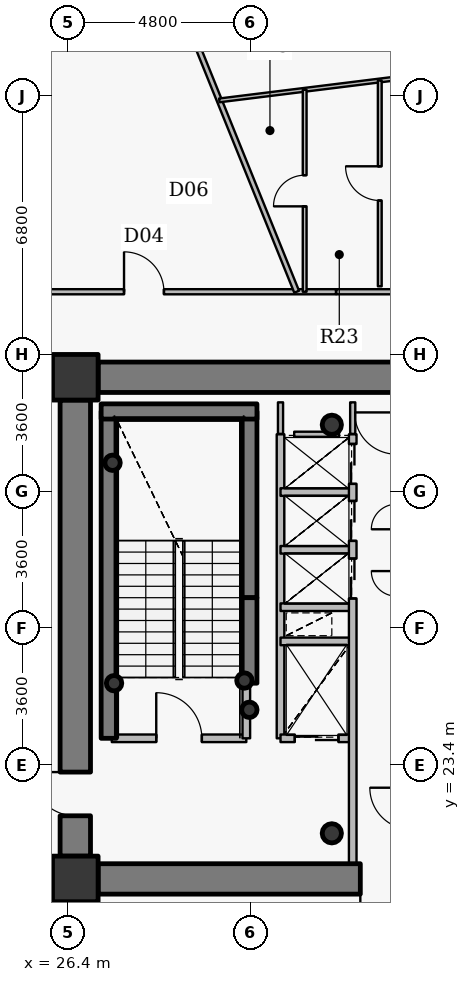
"""IFC4 building model, lengths in metres.
Left out: names, types, materials, properties, quantities, classifications, styles, units other than length and angle.
Written with IfcOpenShell. Run it as: python <this file> out.ifc"""

import sys

from ifc_helpers import new_model, si_unit, direction, frame, frame_2d, origin, origin_2d, place, context, subcontext, project, spatial, rectangle, hollow_circle, extrude, source, transform, mapped, element, fill, save


model = new_model("IFC4")
c1 = context("Model", 3, precision=1e-05, world=origin(), true_north=direction((0.0, 1.0)))
c2 = subcontext(c1, "Body", "Model", "MODEL_VIEW")
j1 = project(units=[si_unit("LENGTHUNIT", "METRE"), si_unit("PLANEANGLEUNIT", "RADIAN")], contexts=[c1])
p1 = place(None, origin())
s1 = spatial("IfcSite", under=j1, at=p1, CompositionType="ELEMENT")
p2 = place(p1, origin())
s2 = spatial("IfcBuilding", under=s1, at=p2, CompositionType="ELEMENT")
p3 = place(p2, frame((0.0, 0.0, 186.15)))
s3 = spatial("IfcBuildingStorey", under=s2, at=p3, CompositionType="ELEMENT", Elevation=186.15)
for number, where, z_axis, x_axis in (
    (1, (26.6, 20.4, 0.0), (0.0, 0.0, 1.0), (1.0, 0.0, 0.0)),
    (2, (26.6, 33.6, 0.0), (0.0, 0.0, 1.0), (1.0, 0.0, 0.0)),
):
    element("IfcColumn", number, at=place(p3, frame(where, z_axis=z_axis, x_axis=x_axis)), inside=s3, PredefinedType="COLUMN", context=c2, shape_type="SweptSolid", body=[
        extrude(rectangle(XDim=1.2, YDim=1.2, at=origin_2d()), origin(), (0.0, 0.0, 1.0), 3.75),
    ])
for number, where, z_axis, x_axis in (
    (3, (33.35, 21.6, 0.0), (0.0, 0.0, 1.0), (1.0, 0.0, 0.0)),
    (4, (33.35, 32.35, 0.0), (0.0, 0.0, 1.0), (1.0, 0.0, 0.0)),
):
    element("IfcColumn", number, at=place(p3, frame(where, z_axis=z_axis, x_axis=x_axis)), inside=s3, PredefinedType="COLUMN", context=c2, shape_type="SweptSolid", body=[
        extrude(hollow_circle(Radius=0.254, WallThickness=0.02, at=origin_2d()), origin(), (0.0, 0.0, 1.0), 3.75),
    ])
p4 = place(p3, frame((27.48, 24.1, 0.0), z_axis=(0.0, 0.0, 1.0), x_axis=(0.0, 1.0, 0.0)))
e5 = element("IfcWall", 5, at=p4, inside=s3, PredefinedType="SHEAR", context=c2, shape_type="SweptSolid", body=[
    extrude(rectangle(XDim=8.6, YDim=0.4, at=frame_2d((4.3, 0.0))), origin(), (0.0, 0.0, 1.0), 3.75),
])
p5 = place(p3, frame((31.18, 27.8, 0.0), z_axis=(0.0, 0.0, 1.0), x_axis=(0.0, 1.0, 0.0)))
e6 = element("IfcWall", 6, at=p5, inside=s3, PredefinedType="SHEAR", context=c2, shape_type="SweptSolid", body=[
    extrude(rectangle(XDim=4.9, YDim=0.4, at=frame_2d((2.45, 0.0))), origin(), (0.0, 0.0, 1.0), 3.75),
])
p6 = place(p3, frame((27.28, 32.7, 0.0), z_axis=(0.0, 0.0, 1.0), x_axis=(1.0, 0.0, 0.0)))
e7 = element("IfcWall", 7, at=p6, inside=s3, PredefinedType="SHEAR", context=c2, shape_type="SweptSolid", body=[
    extrude(rectangle(XDim=4.1, YDim=0.4, at=frame_2d((2.05, 0.0))), origin(), (0.0, 0.0, 1.0), 3.75),
])
for number, where, z_axis, x_axis in (
    (8, (27.58, 31.35, 0.0), (0.0, 0.0, 1.0), (1.0, 0.0, 0.0)),
    (9, (31.05, 25.62, 0.0), (0.0, 0.0, 1.0), (1.0, 0.0, 0.0)),
    (10, (31.18, 24.85, 0.0), (0.0, 0.0, 1.0), (1.0, 0.0, 0.0)),
    (11, (27.62, 25.55, 0.0), (0.0, 0.0, 1.0), (1.0, 0.0, 0.0)),
):
    element("IfcColumn", number, at=place(p3, frame(where, z_axis=z_axis, x_axis=x_axis)), inside=s3, PredefinedType="COLUMN", context=c2, shape_type="SweptSolid", body=[
        extrude(hollow_circle(Radius=0.203, WallThickness=0.016, at=origin_2d()), origin(), (0.0, 0.0, 1.0), 3.75),
    ])
p7 = place(p3, frame((27.2, 33.6, 0.0), z_axis=(0.0, 0.0, 1.0), x_axis=(1.0, 0.0, 0.0)))
e12 = element("IfcWall", 12, at=p7, inside=s3, PredefinedType="SHEAR", context=c2, shape_type="SweptSolid", body=[
    extrude(rectangle(XDim=17.6, YDim=0.8, at=frame_2d((8.8, 0.0))), origin(), (0.0, 0.0, 1.0), 2.95),
])
p8 = place(p7, frame((13.45, 0.0, 0.0)))
e13 = element("IfcOpeningElement", 13, at=p8, cuts=e12, PredefinedType="OPENING", context=c2, shape_type="SweptSolid", body=[
    extrude(rectangle(XDim=1.15, YDim=2.15, at=origin_2d()), frame((0.575, 0.41, 1.075), z_axis=(0.0, -1.0, 0.0), x_axis=(1.0, 0.0, 0.0)), (0.0, 0.0, 1.0), 0.82),
])
p9 = place(p3, frame((44.8, 20.4, 0.0), z_axis=(0.0, 0.0, 1.0), x_axis=(-1.0, 0.0, 0.0)))
e14 = element("IfcWall", 14, at=p9, inside=s3, PredefinedType="SHEAR", context=c2, shape_type="SweptSolid", body=[
    extrude(rectangle(XDim=17.6, YDim=0.8, at=frame_2d((8.8, 0.0))), origin(), (0.0, 0.0, 1.0), 2.95),
])
p10 = place(p9, frame((9.55, 0.0, 0.0)))
e15 = element("IfcOpeningElement", 15, at=p10, cuts=e14, PredefinedType="OPENING", context=c2, shape_type="SweptSolid", body=[
    extrude(rectangle(XDim=1.15, YDim=2.15, at=origin_2d()), frame((0.575, 0.41, 1.075), z_axis=(0.0, -1.0, 0.0), x_axis=(1.0, 0.0, 0.0)), (0.0, 0.0, 1.0), 0.82),
])
p11 = place(p3, frame((26.6, 21.0, 0.0), z_axis=(0.0, 0.0, 1.0), x_axis=(0.0, 1.0, 0.0)))
e16 = element("IfcWall", 16, at=p11, inside=s3, PredefinedType="SHEAR", context=c2, shape_type="SweptSolid", body=[
    extrude(rectangle(XDim=12.0, YDim=0.8, at=frame_2d((6.0, 0.0))), origin(), (0.0, 0.0, 1.0), 2.95),
])
p12 = place(p11, frame((1.061, 0.0, 0.0)))
e17 = element("IfcOpeningElement", 17, at=p12, cuts=e16, PredefinedType="OPENING", context=c2, shape_type="SweptSolid", body=[
    extrude(rectangle(XDim=1.15, YDim=2.15, at=origin_2d()), frame((0.575, 0.41, 1.075), z_axis=(0.0, -1.0, 0.0), x_axis=(1.0, 0.0, 0.0)), (0.0, 0.0, 1.0), 0.82),
])
p13 = place(p3, frame((31.18, 25.55, 0.0), z_axis=(0.0, 0.0, 1.0), x_axis=(0.0, 1.0, 0.0)))
e18 = element("IfcWall", 18, at=p13, inside=s3, PredefinedType="SHEAR", context=c2, shape_type="SweptSolid", body=[
    extrude(rectangle(XDim=2.25, YDim=0.4, at=frame_2d((1.125, 0.0))), origin(), (0.0, 0.0, 1.0), 3.1),
])
p14 = place(p3, frame((24.35, 35.85, 0.0), z_axis=(0.0, 0.0, 1.0), x_axis=(1.0, 0.0, 0.0)))
e19 = element("IfcWall", 19, at=p14, inside=s3, PredefinedType="PARTITIONING", context=c2, shape_type="SweptSolid", body=[
    extrude(rectangle(XDim=9.109, YDim=0.135, at=frame_2d((4.554, 0.0))), origin(), (0.0, 0.0, 1.0), 2.935),
])
p15 = place(p14, frame((3.532, 0.0, 0.0)))
e20 = element("IfcOpeningElement", 20, at=p15, cuts=e19, PredefinedType="OPENING", context=c2, shape_type="SweptSolid", body=[
    extrude(rectangle(XDim=1.05, YDim=2.15, at=origin_2d()), frame((0.525, 0.078, 1.075), z_axis=(0.0, -1.0, 0.0), x_axis=(1.0, 0.0, 0.0)), (0.0, 0.0, 1.0), 0.155),
])
p16 = place(p3, frame((27.56, 24.1, 0.0), z_axis=(0.0, 0.0, 1.0), x_axis=(1.0, 0.0, 0.0)))
e21 = element("IfcWall", 21, at=p16, inside=s3, PredefinedType="PARTITIONING", context=c2, shape_type="SweptSolid", body=[
    extrude(rectangle(XDim=3.54, YDim=0.2, at=frame_2d((1.77, 0.0))), origin(), (0.0, 0.0, 1.0), 3.5),
])
p17 = place(p16, frame((1.17, 0.0, 0.0)))
e22 = element("IfcOpeningElement", 22, at=p17, cuts=e21, PredefinedType="OPENING", context=c2, shape_type="SweptSolid", body=[
    extrude(rectangle(XDim=1.2, YDim=2.15, at=origin_2d()), frame((0.6, 0.11, 1.075), z_axis=(0.0, -1.0, 0.0), x_axis=(1.0, 0.0, 0.0)), (0.0, 0.0, 1.0), 0.22),
])
p18 = place(p3, frame((28.027, 46.735, 0.0), z_axis=(0.0, 0.0, 1.0), x_axis=(0.374604711709, -0.927184614824, 0.0)))
e23 = element("IfcWall", 23, at=p18, inside=s3, PredefinedType="PARTITIONING", context=c2, shape_type="SweptSolid", body=[
    extrude(rectangle(XDim=11.74, YDim=0.135, at=frame_2d((5.87, 0.0))), origin(), (0.0, 0.0, 1.0), 2.935),
])
p19 = place(p3, frame((30.39, 40.885, 0.0), z_axis=(0.0, 0.0, 1.0), x_axis=(0.992397005414, 0.123077957591, 0.0)))
e24 = element("IfcWall", 24, at=p19, inside=s3, PredefinedType="PARTITIONING", context=c2, shape_type="SweptSolid", body=[
    extrude(rectangle(XDim=5.653, YDim=0.1, at=frame_2d((2.827, 0.0))), origin(), (0.0, 0.0, 1.0), 2.935),
])
p20 = place(p3, frame((31.1, 24.1, 0.0), z_axis=(0.0, 0.0, 1.0), x_axis=(0.0, 1.0, 0.0)))
e25 = element("IfcWall", 25, at=p20, inside=s3, PredefinedType="PARTITIONING", context=c2, shape_type="SweptSolid", body=[
    extrude(rectangle(XDim=1.44, YDim=0.2, at=frame_2d((0.72, 0.0))), origin(), (0.0, 0.0, 1.0), 3.5),
])
p21 = place(p3, frame((32.0, 24.1, 0.0), z_axis=(0.0, 0.0, 1.0), x_axis=(0.0, 1.0, 0.0)))
e26 = element("IfcWall", 26, at=p21, inside=s3, PredefinedType="PARTITIONING", context=c2, shape_type="SweptSolid", body=[
    extrude(rectangle(XDim=8.0, YDim=0.2, at=frame_2d((4.0, 0.0))), origin(), (0.0, 0.0, 1.0), 3.5),
])
p22 = place(p3, frame((32.0, 24.1, 0.0), z_axis=(0.0, 0.0, 1.0), x_axis=(1.0, 0.0, 0.0)))
e27 = element("IfcWall", 27, at=p22, inside=s3, PredefinedType="PARTITIONING", context=c2, shape_type="SweptSolid", body=[
    extrude(rectangle(XDim=1.9, YDim=0.2, at=frame_2d((0.95, 0.0))), origin(), (0.0, 0.0, 1.0), 3.085),
])
p23 = place(p22, frame((0.375, 0.0, 0.0)))
e28 = element("IfcOpeningElement", 28, at=p23, cuts=e27, PredefinedType="OPENING", context=c2, shape_type="SweptSolid", body=[
    extrude(rectangle(XDim=1.15, YDim=2.15, at=origin_2d()), frame((0.575, 0.11, 1.075), z_axis=(0.0, -1.0, 0.0), x_axis=(1.0, 0.0, 0.0)), (0.0, 0.0, 1.0), 0.22),
])
for number, where, z_axis, x_axis in (
    (29, (32.0, 26.65, 0.0), (0.0, 0.0, 1.0), (1.0, 0.0, 0.0)),
    (30, (32.0, 27.55, 0.0), (0.0, 0.0, 1.0), (1.0, 0.0, 0.0)),
    (31, (32.0, 29.06, 0.0), (0.0, 0.0, 1.0), (1.0, 0.0, 0.0)),
    (32, (32.0, 30.58, 0.0), (0.0, 0.0, 1.0), (1.0, 0.0, 0.0)),
):
    element("IfcWall", number, at=place(p3, frame(where, z_axis=z_axis, x_axis=x_axis)), inside=s3, PredefinedType="PARTITIONING", context=c2, shape_type="SweptSolid", body=[
        extrude(rectangle(XDim=1.9, YDim=0.2, at=frame_2d((0.95, 0.0))), origin(), (0.0, 0.0, 1.0), 3.085),
    ])
p24 = place(p3, frame((32.636, 35.85, 0.0), z_axis=(0.0, 0.0, 1.0), x_axis=(0.0, 1.0, 0.0)))
e33 = element("IfcWall", 33, at=p24, inside=s3, PredefinedType="PARTITIONING", context=c2, shape_type="SweptSolid", body=[
    extrude(rectangle(XDim=5.314, YDim=0.1, at=frame_2d((2.657, 0.0))), origin(), (0.0, 0.0, 1.0), 3.125),
])
p25 = place(p24, frame((2.247, 0.0, 0.0)))
e34 = element("IfcOpeningElement", 34, at=p25, cuts=e33, PredefinedType="OPENING", context=c2, shape_type="SweptSolid", body=[
    extrude(rectangle(XDim=0.82, YDim=2.1, at=origin_2d()), frame((0.41, 0.06, 1.05), z_axis=(0.0, -1.0, 0.0), x_axis=(1.0, 0.0, 0.0)), (0.0, 0.0, 1.0), 0.12),
])
p26 = place(p3, frame((33.9, 20.8, 0.0), z_axis=(0.0, 0.0, 1.0), x_axis=(0.0, 1.0, 0.0)))
e35 = element("IfcWall", 35, at=p26, inside=s3, PredefinedType="PARTITIONING", context=c2, shape_type="SweptSolid", body=[
    extrude(rectangle(XDim=11.3, YDim=0.2, at=frame_2d((5.65, 0.0))), origin(), (0.0, 0.0, 1.0), 3.085),
])
p27 = place(p26, frame((6.98, 0.0, 0.0)))
e36 = element("IfcOpeningElement", 36, at=p27, cuts=e35, PredefinedType="OPENING", context=c2, shape_type="SweptSolid", body=[
    extrude(rectangle(XDim=1.05, YDim=2.15, at=origin_2d()), frame((0.525, 0.11, 1.075), z_axis=(0.0, -1.0, 0.0), x_axis=(1.0, 0.0, 0.0)), (0.0, 0.0, 1.0), 0.22),
])
p28 = place(p26, frame((8.495, 0.0, 0.0)))
e37 = element("IfcOpeningElement", 37, at=p28, cuts=e35, PredefinedType="OPENING", context=c2, shape_type="SweptSolid", body=[
    extrude(rectangle(XDim=1.05, YDim=2.15, at=origin_2d()), frame((0.525, 0.11, 1.075), z_axis=(0.0, -1.0, 0.0), x_axis=(1.0, 0.0, 0.0)), (0.0, 0.0, 1.0), 0.22),
])
p29 = place(p26, frame((9.995, 0.0, 0.0)))
e38 = element("IfcOpeningElement", 38, at=p29, cuts=e35, PredefinedType="OPENING", context=c2, shape_type="SweptSolid", body=[
    extrude(rectangle(XDim=1.05, YDim=2.15, at=origin_2d()), frame((0.525, 0.11, 1.075), z_axis=(0.0, -1.0, 0.0), x_axis=(1.0, 0.0, 0.0)), (0.0, 0.0, 1.0), 0.22),
])
p30 = place(p3, frame((34.612, 35.993, 0.0), z_axis=(0.0, 0.0, 1.0), x_axis=(0.0, 1.0, 0.0)))
e39 = element("IfcWall", 39, at=p30, inside=s3, PredefinedType="PARTITIONING", context=c2, shape_type="SweptSolid", body=[
    extrude(rectangle(XDim=5.416, YDim=0.1, at=frame_2d((2.708, 0.0))), origin(), (0.0, 0.0, 1.0), 3.125),
])
p31 = place(p30, frame((2.258, 0.0, 0.0)))
e40 = element("IfcOpeningElement", 40, at=p31, cuts=e39, PredefinedType="OPENING", context=c2, shape_type="SweptSolid", body=[
    extrude(rectangle(XDim=0.9, YDim=2.1, at=origin_2d()), frame((0.45, 0.06, 1.05), z_axis=(0.0, -1.0, 0.0), x_axis=(1.0, 0.0, 0.0)), (0.0, 0.0, 1.0), 0.12),
])
p32 = place(p3, frame((32.36, 32.1, 0.0), z_axis=(0.0, 0.0, 1.0), x_axis=(1.0, 0.0, 0.0)))
e41 = element("IfcWall", 41, at=p32, inside=s3, PredefinedType="PARTITIONING", context=c2, shape_type="SweptSolid", body=[
    extrude(rectangle(XDim=1.18, YDim=0.135, at=frame_2d((0.59, 0.0))), origin(), (0.0, 0.0, 1.0), 3.085),
])
p33 = place(p3, frame((32.0, 32.94, 0.0), z_axis=(0.0, 0.0, 1.0), x_axis=(0.0, -1.0, 0.0)))
e42 = element("IfcWall", 42, at=p33, inside=s3, PredefinedType="PARTITIONING", context=c2, shape_type="SweptSolid", body=[
    extrude(rectangle(XDim=0.83, YDim=0.135, at=frame_2d((0.415, 0.0))), origin(), (0.0, 0.0, 1.0), 3.035),
])
p34 = place(p3, frame((33.9, 32.11, 0.0), z_axis=(0.0, 0.0, 1.0), x_axis=(0.0, 1.0, 0.0)))
e43 = element("IfcWall", 43, at=p34, inside=s3, PredefinedType="PARTITIONING", context=c2, shape_type="SweptSolid", body=[
    extrude(rectangle(XDim=0.83, YDim=0.135, at=frame_2d((0.415, 0.0))), origin(), (0.0, 0.0, 1.0), 3.085),
])
p35 = place(p3, frame((33.469, 35.85, 0.0), z_axis=(0.0, 0.0, 1.0), x_axis=(1.0, 0.0, 0.0)))
e44 = element("IfcWall", 44, at=p35, inside=s3, PredefinedType="PARTITIONING", context=c2, shape_type="SweptSolid", body=[
    extrude(rectangle(XDim=2.952, YDim=0.135, at=frame_2d((1.476, 0.0))), origin(), (0.0, 0.0, 1.0), 2.935),
])
p36 = place(p3, frame((27.19, 34.0, 0.0), z_axis=(0.0, 0.0, 1.0), x_axis=(-1.0, 0.0, 0.0)))
e45 = element("IfcWall", 45, at=p36, inside=s3, PredefinedType="PARTITIONING", context=c2, shape_type="SweptSolid", body=[
    extrude(rectangle(XDim=0.99, YDim=0.135, at=frame_2d((0.495, 0.0))), origin(), (0.0, 0.0, 1.0), 2.935),
])
p37 = place(p3, frame((26.2, 33.692, 0.0), z_axis=(0.0, 0.0, 1.0), x_axis=(0.0, -1.0, 0.0)))
e46 = element("IfcWall", 46, at=p37, inside=s3, PredefinedType="PARTITIONING", context=c2, shape_type="SweptSolid", body=[
    extrude(rectangle(XDim=0.682, YDim=0.135, at=frame_2d((0.341, 0.0))), origin(), (0.0, 0.0, 1.0), 3.5),
])
p38 = place(p3, frame((26.2, 20.99, 0.0), z_axis=(0.0, 0.0, 1.0), x_axis=(0.0, -1.0, 0.0)))
e47 = element("IfcWall", 47, at=p38, inside=s3, PredefinedType="PARTITIONING", context=c2, shape_type="SweptSolid", body=[
    extrude(rectangle(XDim=0.99, YDim=0.135, at=frame_2d((0.495, 0.0))), origin(), (0.0, 0.0, 1.0), 3.5),
])
p39 = place(p3, frame((26.508, 20.0, 0.0), z_axis=(0.0, 0.0, 1.0), x_axis=(1.0, 0.0, 0.0)))
e48 = element("IfcWall", 48, at=p39, inside=s3, PredefinedType="PARTITIONING", context=c2, shape_type="SweptSolid", body=[
    extrude(rectangle(XDim=0.682, YDim=0.135, at=frame_2d((0.341, 0.0))), origin(), (0.0, 0.0, 1.0), 2.935),
])
m1 = source(origin(), c2, "Body", "SweptSolid", [
    extrude(rectangle(XDim=1.15, YDim=2.15, at=origin_2d()), frame((0.575, 0.025, 1.075), z_axis=(0.0, -1.0, 0.0), x_axis=(1.0, 0.0, 0.0)), (0.0, 0.0, 1.0), 0.05),
])
p40 = place(p12, origin())
e49 = element("IfcDoor", 49, at=p40, inside=s3, OperationType="SINGLE_SWING_RIGHT", PredefinedType="DOOR", context=c2, shape_type="MappedRepresentation", body=[
    mapped(m1, transform((0.0, 0.0, 0.0), x_axis=(1.0, 0.0, 0.0), y_axis=(0.0, 1.0, 0.0), z_axis=(0.0, 0.0, 1.0), scale=1.0)),
])
fill(e17, e49)
p41 = place(p10, origin())
e50 = element("IfcDoor", 50, at=p41, inside=s3, OperationType="SINGLE_SWING_RIGHT", PredefinedType="DOOR", context=c2, shape_type="MappedRepresentation", body=[
    mapped(m1, transform((0.0, 0.0, 0.0), x_axis=(1.0, 0.0, 0.0), y_axis=(0.0, 1.0, 0.0), z_axis=(0.0, 0.0, 1.0), scale=1.0)),
])
fill(e15, e50)
m2 = source(origin(), c2, "Body", "SweptSolid", [
    extrude(rectangle(XDim=1.2, YDim=2.15, at=origin_2d()), frame((0.6, 0.025, 1.075), z_axis=(0.0, -1.0, 0.0), x_axis=(1.0, 0.0, 0.0)), (0.0, 0.0, 1.0), 0.05),
])
p42 = place(p17, origin())
e51 = element("IfcDoor", 51, at=p42, inside=s3, OperationType="SINGLE_SWING_LEFT", PredefinedType="DOOR", context=c2, shape_type="MappedRepresentation", body=[
    mapped(m2, transform((0.0, 0.0, 0.0), x_axis=(1.0, 0.0, 0.0), y_axis=(0.0, 1.0, 0.0), z_axis=(0.0, 0.0, 1.0), scale=1.0)),
])
fill(e22, e51)
m3 = source(origin(), c2, "Body", "SweptSolid", [
    extrude(rectangle(XDim=1.15, YDim=2.15, at=origin_2d()), frame((0.575, 0.025, 1.075), z_axis=(0.0, -1.0, 0.0), x_axis=(1.0, 0.0, 0.0)), (0.0, 0.0, 1.0), 0.05),
])
p43 = place(p23, origin())
e52 = element("IfcDoor", 52, at=p43, inside=s3, OperationType="DOUBLE_DOOR_SLIDING", PredefinedType="USERDEFINED", context=c2, shape_type="MappedRepresentation", body=[
    mapped(m3, transform((0.0, 0.0, 0.0), x_axis=(1.0, 0.0, 0.0), y_axis=(0.0, 1.0, 0.0), z_axis=(0.0, 0.0, 1.0), scale=1.0)),
])
fill(e28, e52)
m4 = source(origin(), c2, "Body", "SweptSolid", [
    extrude(rectangle(XDim=1.05, YDim=2.15, at=origin_2d()), frame((0.525, 0.025, 1.075), z_axis=(0.0, -1.0, 0.0), x_axis=(1.0, 0.0, 0.0)), (0.0, 0.0, 1.0), 0.05),
])
p44 = place(p27, origin())
e53 = element("IfcDoor", 53, at=p44, inside=s3, OperationType="DOUBLE_DOOR_SLIDING", PredefinedType="USERDEFINED", context=c2, shape_type="MappedRepresentation", body=[
    mapped(m4, transform((0.0, 0.0, 0.0), x_axis=(1.0, 0.0, 0.0), y_axis=(0.0, 1.0, 0.0), z_axis=(0.0, 0.0, 1.0), scale=1.0)),
])
fill(e36, e53)
p45 = place(p28, origin())
e54 = element("IfcDoor", 54, at=p45, inside=s3, OperationType="DOUBLE_DOOR_SLIDING", PredefinedType="USERDEFINED", context=c2, shape_type="MappedRepresentation", body=[
    mapped(m4, transform((0.0, 0.0, 0.0), x_axis=(1.0, 0.0, 0.0), y_axis=(0.0, 1.0, 0.0), z_axis=(0.0, 0.0, 1.0), scale=1.0)),
])
fill(e37, e54)
p46 = place(p29, origin())
e55 = element("IfcDoor", 55, at=p46, inside=s3, OperationType="DOUBLE_DOOR_SLIDING", PredefinedType="USERDEFINED", context=c2, shape_type="MappedRepresentation", body=[
    mapped(m4, transform((0.0, 0.0, 0.0), x_axis=(1.0, 0.0, 0.0), y_axis=(0.0, 1.0, 0.0), z_axis=(0.0, 0.0, 1.0), scale=1.0)),
])
fill(e38, e55)
m5 = source(origin(), c2, "Body", "SweptSolid", [
    extrude(rectangle(XDim=0.9, YDim=2.1, at=origin_2d()), frame((0.45, 0.025, 1.05), z_axis=(0.0, -1.0, 0.0), x_axis=(1.0, 0.0, 0.0)), (0.0, 0.0, 1.0), 0.05),
])
p47 = place(p31, origin())
e56 = element("IfcDoor", 56, at=p47, inside=s3, OperationType="SINGLE_SWING_RIGHT", PredefinedType="DOOR", context=c2, shape_type="MappedRepresentation", body=[
    mapped(m5, transform((0.0, 0.0, 0.0), x_axis=(1.0, 0.0, 0.0), y_axis=(0.0, 1.0, 0.0), z_axis=(0.0, 0.0, 1.0), scale=1.0)),
])
fill(e40, e56)
m6 = source(origin(), c2, "Body", "SweptSolid", [
    extrude(rectangle(XDim=0.82, YDim=2.1, at=origin_2d()), frame((0.41, 0.025, 1.05), z_axis=(0.0, -1.0, 0.0), x_axis=(1.0, 0.0, 0.0)), (0.0, 0.0, 1.0), 0.05),
])
p48 = place(p25, origin())
e57 = element("IfcDoor", 57, at=p48, inside=s3, OperationType="SINGLE_SWING_LEFT", PredefinedType="DOOR", context=c2, shape_type="MappedRepresentation", body=[
    mapped(m6, transform((0.0, 0.0, 0.0), x_axis=(1.0, 0.0, 0.0), y_axis=(0.0, 1.0, 0.0), z_axis=(0.0, 0.0, 1.0), scale=1.0)),
])
fill(e34, e57)
m7 = source(origin(), c2, "Body", "SweptSolid", [
    extrude(rectangle(XDim=1.05, YDim=2.15, at=origin_2d()), frame((0.525, 0.025, 1.075), z_axis=(0.0, -1.0, 0.0), x_axis=(1.0, 0.0, 0.0)), (0.0, 0.0, 1.0), 0.05),
])
p49 = place(p15, origin())
e58 = element("IfcDoor", 58, at=p49, inside=s3, OperationType="SINGLE_SWING_LEFT", PredefinedType="DOOR", context=c2, shape_type="MappedRepresentation", body=[
    mapped(m7, transform((0.0, 0.0, 0.0), x_axis=(1.0, 0.0, 0.0), y_axis=(0.0, 1.0, 0.0), z_axis=(0.0, 0.0, 1.0), scale=1.0)),
])
fill(e20, e58)
save(model, sys.argv[1])
